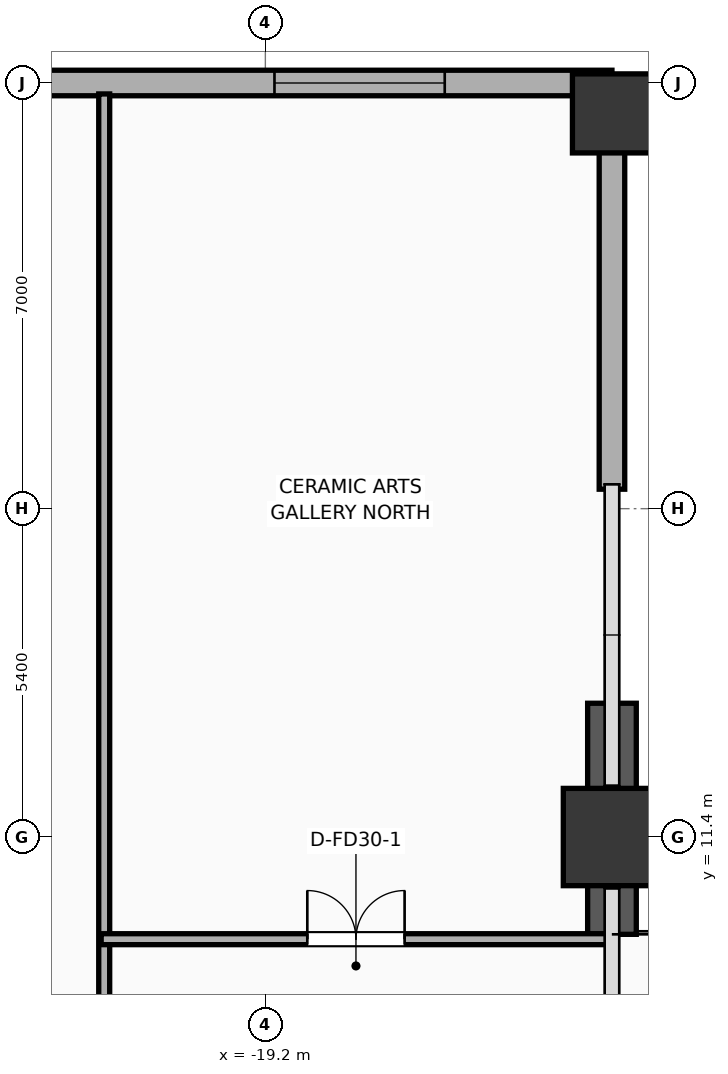
"""IFC4 building model, lengths in metres.
Left out: names, types, materials, properties, quantities, classifications, styles, units other than length and angle.
Written with IfcOpenShell. Run it as: python <this file> out.ifc"""

import sys

from ifc_helpers import new_model, si_unit, direction, frame, frame_2d, origin, origin_2d, place, context, subcontext, project, spatial, rectangle, extrude, element, fill, save


model = new_model("IFC4")
c1 = context("Model", 3, precision=1e-05, world=origin(), true_north=direction((0.0, 1.0)))
c2 = subcontext(c1, "Body", "Model", "MODEL_VIEW")
j1 = project(units=[si_unit("LENGTHUNIT", "METRE"), si_unit("PLANEANGLEUNIT", "RADIAN")], contexts=[c1])
p1 = place(None, origin())
s1 = spatial("IfcSite", under=j1, at=p1, CompositionType="ELEMENT")
p2 = place(p1, origin())
s2 = spatial("IfcBuilding", under=s1, at=p2, CompositionType="ELEMENT")
p3 = place(p2, frame((0.0, 0.0, 5.2)))
s3 = spatial("IfcBuildingStorey", under=s2, at=p3, CompositionType="ELEMENT", Elevation=5.2)
p4 = place(p3, frame((-13.5, 11.4, 0.0), z_axis=(0.0, 0.0, 1.0), x_axis=(1.0, 0.0, 0.0)))
e1 = element("IfcColumn", 1, at=p4, inside=s3, PredefinedType="COLUMN", context=c2, shape_type="SweptSolid", body=[
    extrude(rectangle(XDim=1.6, YDim=1.6, at=origin_2d()), origin(), (0.0, 0.0, 1.0), 5.2),
])
p5 = place(p3, frame((-13.5, 23.3, 0.0), z_axis=(0.0, 0.0, 1.0), x_axis=(1.0, 0.0, 0.0)))
e2 = element("IfcColumn", 2, at=p5, inside=s3, PredefinedType="COLUMN", context=c2, shape_type="SweptSolid", body=[
    extrude(rectangle(XDim=1.3, YDim=1.3, at=origin_2d()), origin(), (0.0, 0.0, 1.0), 5.2),
])
p6 = place(p3, frame((-13.5, 9.8, 0.0), z_axis=(0.0, 0.0, 1.0), x_axis=(0.0, 1.0, 0.0)))
e3 = element("IfcWall", 3, at=p6, inside=s3, PredefinedType="SOLIDWALL", context=c2, shape_type="SweptSolid", body=[
    extrude(rectangle(XDim=3.8, YDim=0.8, at=frame_2d((1.9, 0.0))), origin(), (0.0, 0.0, 1.0), 4.92),
])
p7 = place(p3, frame((-13.5, 17.12, 0.0), z_axis=(0.0, 0.0, 1.0), x_axis=(0.0, 1.0, 0.0)))
e4 = element("IfcWall", 4, at=p7, inside=s3, PredefinedType="ELEMENTEDWALL", context=c2, shape_type="SweptSolid", body=[
    extrude(rectangle(XDim=6.68, YDim=0.42, at=frame_2d((3.34, 0.0))), origin(), (0.0, 0.0, 1.0), 4.21),
])
p8 = place(p3, frame((-13.5, 23.8, 0.0), z_axis=(0.0, 0.0, 1.0), x_axis=(-1.0, 0.0, 0.0)))
e5 = element("IfcWall", 5, at=p8, inside=s3, PredefinedType="ELEMENTEDWALL", context=c2, shape_type="SweptSolid", body=[
    extrude(rectangle(XDim=24.9, YDim=0.42, at=frame_2d((12.45, 0.0))), origin(), (0.0, 0.0, 1.0), 4.92),
])
p9 = place(p8, frame((2.75, 0.0, 0.65)))
e6 = element("IfcOpeningElement", 6, at=p9, cuts=e5, PredefinedType="OPENING", context=c2, shape_type="SweptSolid", body=[
    extrude(rectangle(XDim=2.8, YDim=2.6, at=frame_2d((1.4, 1.3))), frame((0.0, 0.22, 0.0), z_axis=(0.0, -1.0, 0.0), x_axis=(1.0, 0.0, 0.0)), (0.0, 0.0, 1.0), 0.44),
])
p10 = place(p8, frame((19.35, 0.0, 0.65)))
e7 = element("IfcOpeningElement", 7, at=p10, cuts=e5, PredefinedType="OPENING", context=c2, shape_type="SweptSolid", body=[
    extrude(rectangle(XDim=2.8, YDim=2.6, at=frame_2d((1.4, 1.3))), frame((0.0, 0.22, 0.0), z_axis=(0.0, -1.0, 0.0), x_axis=(1.0, 0.0, 0.0)), (0.0, 0.0, 1.0), 0.44),
])
p11 = place(p3, frame((-21.85, -10.5, 0.0), z_axis=(0.0, 0.0, 1.0), x_axis=(0.0, 1.0, 0.0)))
e8 = element("IfcWall", 8, at=p11, inside=s3, PredefinedType="PARTITIONING", context=c2, shape_type="SweptSolid", body=[
    extrude(rectangle(XDim=34.12, YDim=0.18, at=frame_2d((17.06, 0.0))), origin(), (0.0, 0.0, 1.0), 4.92),
])
p12 = place(p11, frame((13.531, 0.0, 0.0)))
e9 = element("IfcOpeningElement", 9, at=p12, cuts=e8, PredefinedType="OPENING", context=c2, shape_type="SweptSolid", body=[
    extrude(rectangle(XDim=1.6, YDim=2.05, at=frame_2d((0.8, 1.025))), frame((0.0, 0.1, 0.0), z_axis=(0.0, -1.0, 0.0), x_axis=(1.0, 0.0, 0.0)), (0.0, 0.0, 1.0), 0.2),
])
p13 = place(p3, frame((-21.9, 9.72, 0.0), z_axis=(0.0, 0.0, 1.0), x_axis=(1.0, 0.0, 0.0)))
e10 = element("IfcWall", 10, at=p13, inside=s3, PredefinedType="PARTITIONING", context=c2, shape_type="SweptSolid", body=[
    extrude(rectangle(XDim=8.38, YDim=0.18, at=frame_2d((4.19, 0.0))), origin(), (0.0, 0.0, 1.0), 4.92),
])
p14 = place(p13, frame((3.39, 0.0, 0.0)))
e11 = element("IfcOpeningElement", 11, at=p14, cuts=e10, PredefinedType="OPENING", context=c2, shape_type="SweptSolid", body=[
    extrude(rectangle(XDim=1.6, YDim=2.05, at=frame_2d((0.8, 1.025))), frame((0.0, 0.1, 0.0), z_axis=(0.0, -1.0, 0.0), x_axis=(1.0, 0.0, 0.0)), (0.0, 0.0, 1.0), 0.2),
])
p15 = place(p9, origin())
e12 = element("IfcWindow", 12, at=p15, inside=s3, PartitioningType="SINGLE_PANEL", PredefinedType="WINDOW", context=c2, shape_type="SweptSolid", body=[
    extrude(rectangle(XDim=2.8, YDim=2.6, at=frame_2d((1.4, 1.3))), frame((0.0, 0.03, 0.0), z_axis=(0.0, -1.0, 0.0), x_axis=(1.0, 0.0, 0.0)), (0.0, 0.0, 1.0), 0.06),
])
fill(e6, e12)
p16 = place(p14, origin())
e13 = element("IfcDoor", 13, at=p16, inside=s3, OperationType="DOUBLE_DOOR_SINGLE_SWING", PredefinedType="DOOR", context=c2, shape_type="SweptSolid", body=[
    extrude(rectangle(XDim=1.6, YDim=2.05, at=frame_2d((0.8, 1.025))), frame((0.0, 0.025, 0.0), z_axis=(0.0, -1.0, 0.0), x_axis=(1.0, 0.0, 0.0)), (0.0, 0.0, 1.0), 0.05),
])
fill(e11, e13)
save(model, sys.argv[1])
